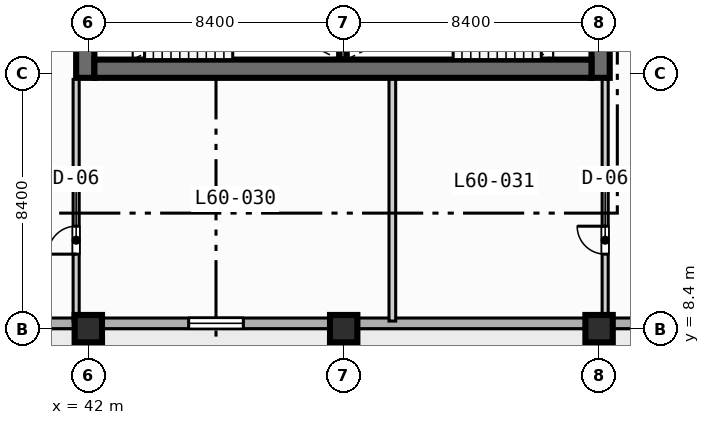
"""IFC4 building model, lengths in metres.
Left out: names, types, materials, properties, quantities, classifications, styles, units other than length and angle.
Written with IfcOpenShell. Run it as: python <this file> out.ifc"""

import sys

from ifc_helpers import new_model, si_unit, direction, frame, frame_2d, origin, origin_2d, place, context, subcontext, project, spatial, rectangle, extrude, element, fill, save


model = new_model("IFC4")
c1 = context("Model", 3, precision=1e-05, world=origin(), true_north=direction((0.0, 1.0)))
c2 = subcontext(c1, "Body", "Model", "MODEL_VIEW")
j1 = project(units=[si_unit("LENGTHUNIT", "METRE"), si_unit("PLANEANGLEUNIT", "RADIAN")], contexts=[c1])
p1 = place(None, origin())
s1 = spatial("IfcSite", under=j1, at=p1, CompositionType="ELEMENT")
p2 = place(p1, origin())
s2 = spatial("IfcBuilding", under=s1, at=p2, CompositionType="ELEMENT")
p3 = place(p2, frame((0.0, 0.0, 245.3)))
s3 = spatial("IfcBuildingStorey", under=s2, at=p3, CompositionType="ELEMENT", Elevation=245.3)
p4 = place(p3, frame((50.375, 17.25, 0.0), z_axis=(0.0, 0.0, 1.0), x_axis=(0.0, 1.0, 0.0)))
e1 = element("IfcWall", 1, at=p4, inside=s3, PredefinedType="SOLIDWALL", context=c2, shape_type="SweptSolid", body=[
    extrude(rectangle(XDim=3.5, YDim=0.25, at=frame_2d((1.75, 0.0))), origin(), (0.0, 0.0, 1.0), 3.47),
])
for number, where, z_axis, x_axis in (
    (2, (41.9, 16.65, 0.0), (0.0, 0.0, 1.0), (0.0, 1.0, 0.0)),
    (3, (58.85, 16.65, 0.0), (0.0, 0.0, 1.0), (0.0, 1.0, 0.0)),
):
    element("IfcWall", number, at=place(p3, frame(where, z_axis=z_axis, x_axis=x_axis)), inside=s3, PredefinedType="SHEAR", context=c2, shape_type="SweptSolid", body=[
        extrude(rectangle(XDim=1.35, YDim=0.6, at=frame_2d((0.675, 0.0))), origin(), (0.0, 0.0, 1.0), 3.47),
    ])
p5 = place(p3, frame((42.2, 16.95, 0.0), z_axis=(0.0, 0.0, 1.0), x_axis=(1.0, 0.0, 0.0)))
e4 = element("IfcWall", 4, at=p5, inside=s3, PredefinedType="SHEAR", context=c2, shape_type="SweptSolid", body=[
    extrude(rectangle(XDim=16.35, YDim=0.6, at=frame_2d((8.175, 0.0))), origin(), (0.0, 0.0, 1.0), 3.47),
])
for number, where, z_axis, x_axis in (
    (5, (42.0, 8.4, 0.0), (0.0, 0.0, 1.0), (1.0, 0.0, 0.0)),
    (6, (50.4, 8.4, 0.0), (0.0, 0.0, 1.0), (1.0, 0.0, 0.0)),
    (7, (58.8, 8.4, 0.0), (0.0, 0.0, 1.0), (1.0, 0.0, 0.0)),
):
    element("IfcColumn", number, at=place(p3, frame(where, z_axis=z_axis, x_axis=x_axis)), inside=s3, PredefinedType="COLUMN", context=c2, shape_type="SweptSolid", body=[
        extrude(rectangle(XDim=0.9, YDim=0.9, at=origin_2d()), origin(), (0.0, 0.0, 1.0), 3.7),
    ])
p6 = place(p3, frame((72.425, 8.575, 0.0), z_axis=(0.0, 0.0, 1.0), x_axis=(-1.0, 0.0, 0.0)))
e8 = element("IfcWall", 8, at=p6, inside=s3, PredefinedType="STANDARD", context=c2, shape_type="SweptSolid", body=[
    extrude(rectangle(XDim=60.85, YDim=0.35, at=frame_2d((30.425, 0.0))), origin(), (0.0, 0.0, 1.0), 3.47),
])
p7 = place(p6, frame((42.325, 0.0, 0.0)))
e9 = element("IfcOpeningElement", 9, at=p7, cuts=e8, PredefinedType="OPENING", context=c2, shape_type="SweptSolid", body=[
    extrude(rectangle(XDim=1.4, YDim=2.2, at=frame_2d((0.7, 1.1))), frame((0.0, 0.185, 0.0), z_axis=(0.0, -1.0, 0.0), x_axis=(1.0, 0.0, 0.0)), (0.0, 0.0, 1.0), 0.37),
])
p8 = place(p6, frame((50.225, 0.0, 0.85)))
e10 = element("IfcOpeningElement", 10, at=p8, cuts=e8, PredefinedType="OPENING", context=c2, shape_type="SweptSolid", body=[
    extrude(rectangle(XDim=2.4, YDim=1.95, at=frame_2d((1.2, 0.975))), frame((0.0, 0.185, 0.0), z_axis=(0.0, -1.0, 0.0), x_axis=(1.0, 0.0, 0.0)), (0.0, 0.0, 1.0), 0.37),
])
p9 = place(p6, frame((33.425, 0.0, 0.85)))
e11 = element("IfcOpeningElement", 11, at=p9, cuts=e8, PredefinedType="OPENING", context=c2, shape_type="SweptSolid", body=[
    extrude(rectangle(XDim=2.4, YDim=1.95, at=frame_2d((1.2, 0.975))), frame((0.0, 0.185, 0.0), z_axis=(0.0, -1.0, 0.0), x_axis=(1.0, 0.0, 0.0)), (0.0, 0.0, 1.0), 0.37),
])
p10 = place(p6, frame((25.325, 0.0, 0.85)))
e12 = element("IfcOpeningElement", 12, at=p10, cuts=e8, PredefinedType="OPENING", context=c2, shape_type="SweptSolid", body=[
    extrude(rectangle(XDim=1.8, YDim=1.8, at=frame_2d((0.9, 0.9))), frame((0.0, 0.185, 0.0), z_axis=(0.0, -1.0, 0.0), x_axis=(1.0, 0.0, 0.0)), (0.0, 0.0, 1.0), 0.37),
])
p11 = place(p6, frame((58.675, 0.0, 0.85)))
e13 = element("IfcOpeningElement", 13, at=p11, cuts=e8, PredefinedType="OPENING", context=c2, shape_type="SweptSolid", body=[
    extrude(rectangle(XDim=1.8, YDim=1.8, at=frame_2d((0.9, 0.9))), frame((0.0, 0.185, 0.0), z_axis=(0.0, -1.0, 0.0), x_axis=(1.0, 0.0, 0.0)), (0.0, 0.0, 1.0), 0.37),
])
p12 = place(p3, frame((41.6, 8.65, 0.0), z_axis=(0.0, 0.0, 1.0), x_axis=(0.0, 1.0, 0.0)))
e14 = element("IfcWall", 14, at=p12, inside=s3, PredefinedType="PARTITIONING", context=c2, shape_type="SweptSolid", body=[
    extrude(rectangle(XDim=7.95, YDim=0.2, at=frame_2d((3.975, 0.0))), origin(), (0.0, 0.0, 1.0), 3.47),
])
p13 = place(p12, frame((2.2, 0.0, 0.0)))
e15 = element("IfcOpeningElement", 15, at=p13, cuts=e14, PredefinedType="OPENING", context=c2, shape_type="SweptSolid", body=[
    extrude(rectangle(XDim=0.92, YDim=2.1, at=frame_2d((0.46, 1.05))), frame((0.0, 0.11, 0.0), z_axis=(0.0, -1.0, 0.0), x_axis=(1.0, 0.0, 0.0)), (0.0, 0.0, 1.0), 0.22),
])
p14 = place(p3, frame((59.0, 8.65, 0.0), z_axis=(0.0, 0.0, 1.0), x_axis=(0.0, 1.0, 0.0)))
e16 = element("IfcWall", 16, at=p14, inside=s3, PredefinedType="PARTITIONING", context=c2, shape_type="SweptSolid", body=[
    extrude(rectangle(XDim=7.95, YDim=0.2, at=frame_2d((3.975, 0.0))), origin(), (0.0, 0.0, 1.0), 2.859),
])
p15 = place(p14, frame((2.2, 0.0, 0.0)))
e17 = element("IfcOpeningElement", 17, at=p15, cuts=e16, PredefinedType="OPENING", context=c2, shape_type="SweptSolid", body=[
    extrude(rectangle(XDim=0.92, YDim=2.1, at=frame_2d((0.46, 1.05))), frame((0.0, 0.11, 0.0), z_axis=(0.0, -1.0, 0.0), x_axis=(1.0, 0.0, 0.0)), (0.0, 0.0, 1.0), 0.22),
])
p16 = place(p3, frame((52.0, 8.65, 0.0), z_axis=(0.0, 0.0, 1.0), x_axis=(0.0, 1.0, 0.0)))
e18 = element("IfcWall", 18, at=p16, inside=s3, PredefinedType="PARTITIONING", context=c2, shape_type="SweptSolid", body=[
    extrude(rectangle(XDim=7.95, YDim=0.22, at=frame_2d((3.975, 0.0))), origin(), (0.0, 0.0, 1.0), 3.47),
])
p17 = place(p10, origin())
e19 = element("IfcWindow", 19, at=p17, inside=s3, PartitioningType="SINGLE_PANEL", PredefinedType="WINDOW", context=c2, shape_type="SweptSolid", body=[
    extrude(rectangle(XDim=1.8, YDim=1.8, at=frame_2d((0.9, 0.9))), frame((0.0, 0.03, 0.0), z_axis=(0.0, -1.0, 0.0), x_axis=(1.0, 0.0, 0.0)), (0.0, 0.0, 1.0), 0.06),
])
fill(e12, e19)
p18 = place(p13, origin())
e20 = element("IfcDoor", 20, at=p18, inside=s3, OperationType="SINGLE_SWING_LEFT", PredefinedType="DOOR", context=c2, shape_type="SweptSolid", body=[
    extrude(rectangle(XDim=0.92, YDim=2.1, at=frame_2d((0.46, 1.05))), frame((0.0, 0.025, 0.0), z_axis=(0.0, -1.0, 0.0), x_axis=(1.0, 0.0, 0.0)), (0.0, 0.0, 1.0), 0.05),
])
fill(e15, e20)
p19 = place(p15, origin())
e21 = element("IfcDoor", 21, at=p19, inside=s3, OperationType="SINGLE_SWING_RIGHT", PredefinedType="DOOR", context=c2, shape_type="SweptSolid", body=[
    extrude(rectangle(XDim=0.92, YDim=2.1, at=frame_2d((0.46, 1.05))), frame((0.0, 0.025, 0.0), z_axis=(0.0, -1.0, 0.0), x_axis=(1.0, 0.0, 0.0)), (0.0, 0.0, 1.0), 0.05),
])
fill(e17, e21)
save(model, sys.argv[1])
